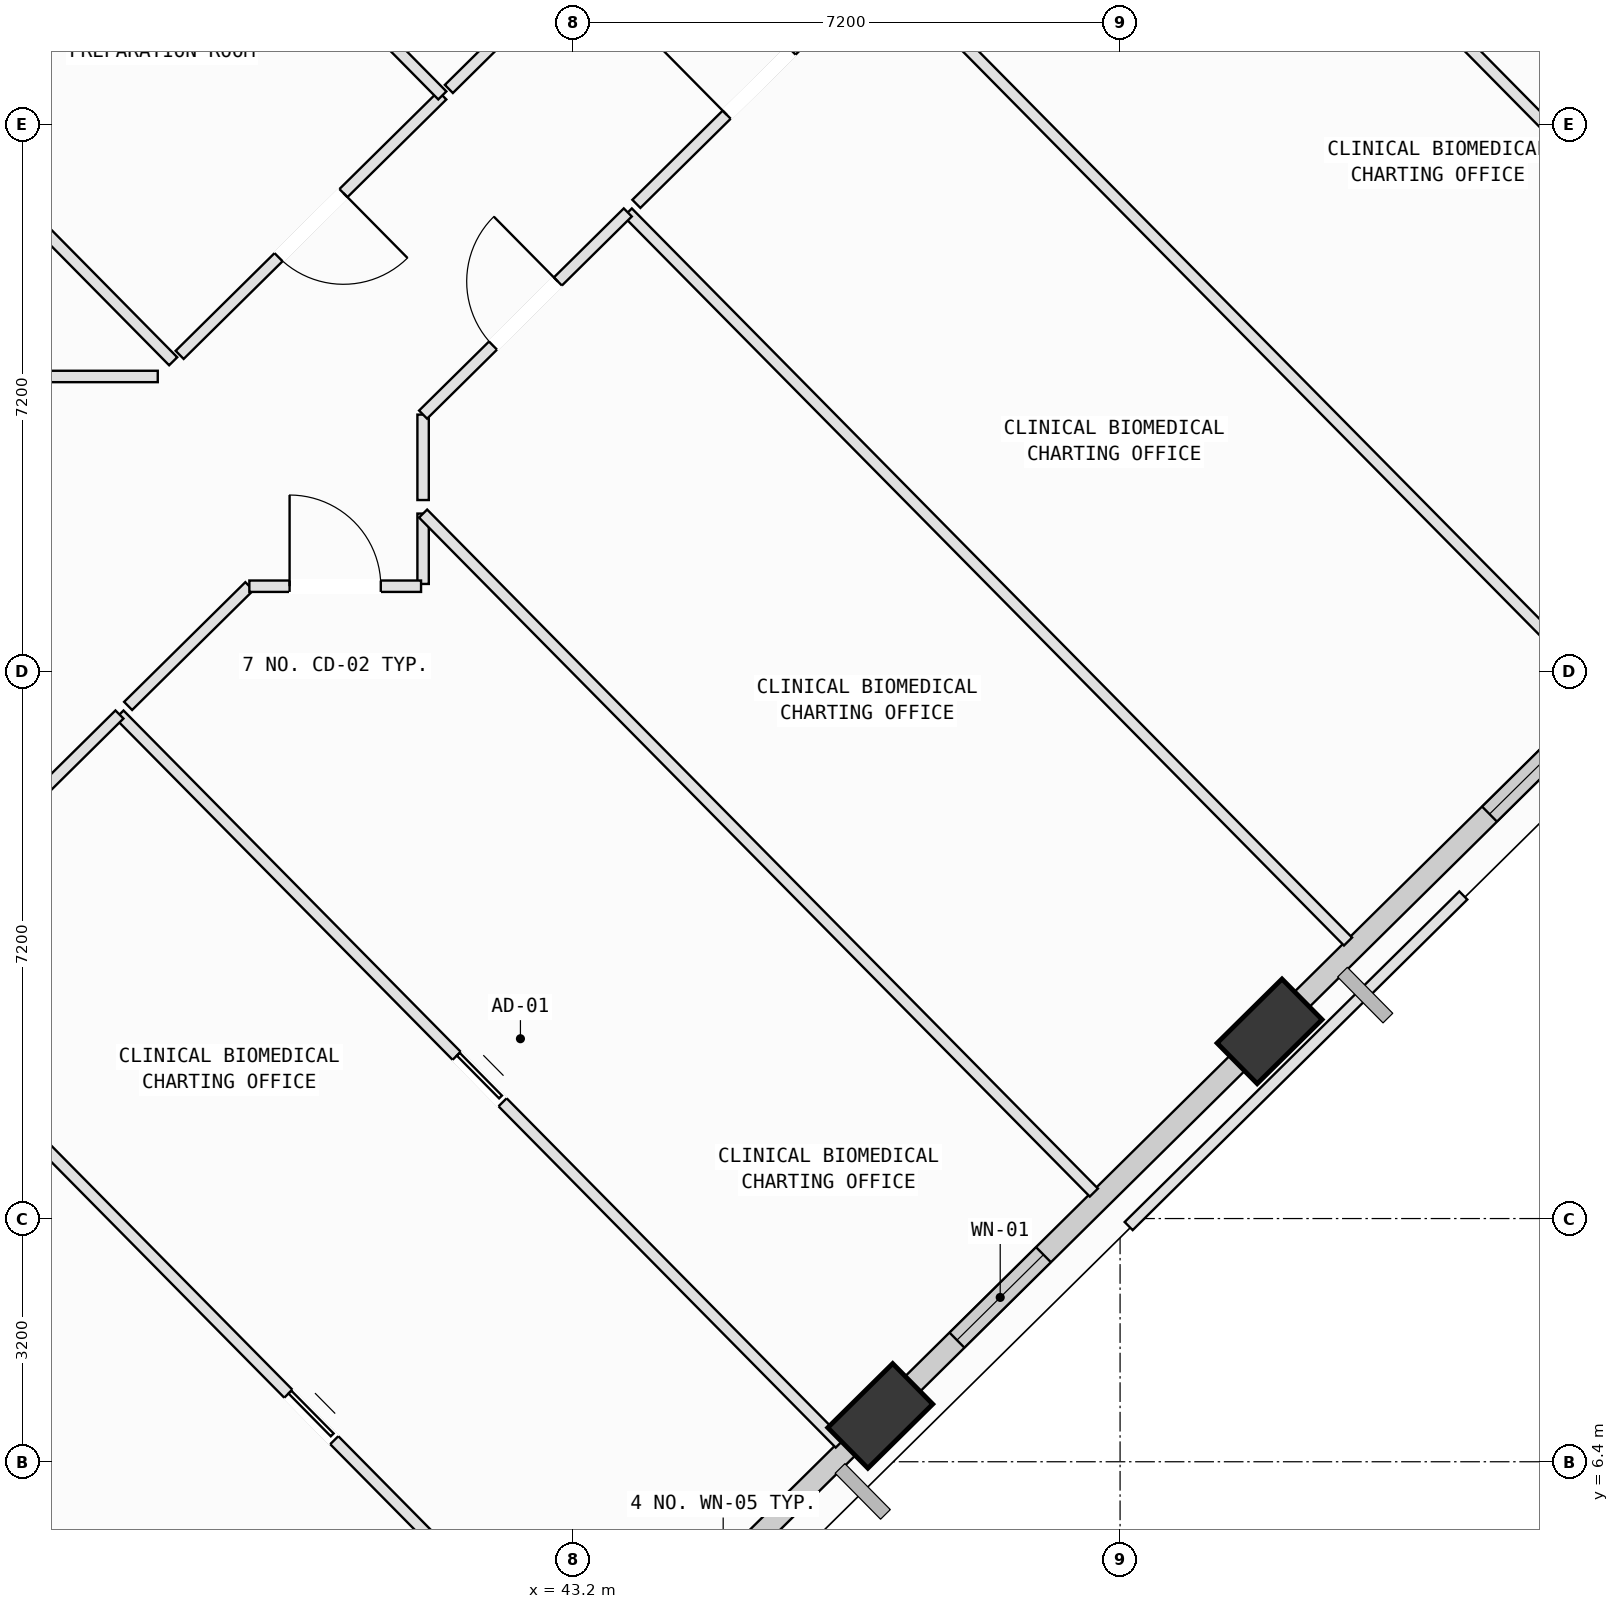
"""IFC4 building model, lengths in metres.
Left out: names, types, materials, properties, quantities, classifications, styles, units other than length and angle.
Written with IfcOpenShell. Run it as: python <this file> out.ifc"""

import sys

from ifc_helpers import new_model, si_unit, direction, frame, frame_2d, origin, origin_2d, place, context, subcontext, project, spatial, rectangle, extrude, element, fill, save


model = new_model("IFC4")
c1 = context("Model", 3, precision=1e-05, world=origin(), true_north=direction((0.0, 1.0)))
c2 = subcontext(c1, "Body", "Model", "MODEL_VIEW")
j1 = project(units=[si_unit("LENGTHUNIT", "METRE"), si_unit("PLANEANGLEUNIT", "RADIAN")], contexts=[c1])
p1 = place(None, origin())
s1 = spatial("IfcSite", under=j1, at=p1, CompositionType="ELEMENT")
p2 = place(p1, origin())
s2 = spatial("IfcBuilding", under=s1, at=p2, CompositionType="ELEMENT")
p3 = place(p2, frame((0.0, 0.0, 215.2)))
s3 = spatial("IfcBuildingStorey", under=s2, at=p3, CompositionType="ELEMENT", Elevation=215.2)
p4 = place(p3, frame((47.245, 7.003, 0.002), z_axis=(0.072994502566, 0.056935712002, 0.995705843758), x_axis=(-0.989301110701, 0.130578425032, 0.065058337529)))
e1 = element("IfcColumn", 1, at=p4, inside=s3, PredefinedType="COLUMN", context=c2, shape_type="SweptSolid", body=[
    extrude(rectangle(XDim=1.2, YDim=0.75, at=origin_2d()), origin(), (0.0, 0.0, 1.0), 4.014),
])
p5 = place(p3, frame((52.367, 12.063, 0.002), z_axis=(0.051942793998, 0.077853368054, 0.995610766934), x_axis=(-0.980116876349, -0.187202601198, 0.065773055283)))
e2 = element("IfcColumn", 2, at=p5, inside=s3, PredefinedType="COLUMN", context=c2, shape_type="SweptSolid", body=[
    extrude(rectangle(XDim=1.2, YDim=0.75, at=origin_2d()), origin(), (0.0, 0.0, 1.0), 4.014),
])
p6 = place(p3, frame((47.094, 6.854, 0.0), z_axis=(0.0, 0.0, 1.0), x_axis=(-0.711433096034, -0.702753833051, 0.0)))
e3 = element("IfcWall", 3, at=p6, inside=s3, PredefinedType="SOLIDWALL", context=c2, shape_type="SweptSolid", body=[
    extrude(rectangle(XDim=6.414, YDim=0.28, at=frame_2d((3.207, 0.0))), origin(), (0.0, 0.0, 1.0), 3.265),
])
p7 = place(p6, frame((2.093, 0.0, 0.75)))
e4 = element("IfcOpeningElement", 4, at=p7, cuts=e3, PredefinedType="OPENING", context=c2, shape_type="SweptSolid", body=[
    extrude(rectangle(XDim=1.2, YDim=1.75, at=frame_2d((0.6, 0.875))), frame((0.0, 0.15, 0.0), z_axis=(0.0, -1.0, 0.0), x_axis=(1.0, 0.0, 0.0)), (0.0, 0.0, 1.0), 0.3),
])
p8 = place(p3, frame((52.216, 11.915, 0.0), z_axis=(0.0, 0.0, 1.0), x_axis=(-0.711418692423, -0.702768414252, 0.0)))
e5 = element("IfcWall", 5, at=p8, inside=s3, PredefinedType="SOLIDWALL", context=c2, shape_type="SweptSolid", body=[
    extrude(rectangle(XDim=6.407, YDim=0.28, at=frame_2d((3.203, 0.0))), origin(), (0.0, 0.0, 1.0), 3.265),
])
p9 = place(p8, frame((3.97, 0.0, 0.75)))
e6 = element("IfcOpeningElement", 6, at=p9, cuts=e5, PredefinedType="OPENING", context=c2, shape_type="SweptSolid", body=[
    extrude(rectangle(XDim=1.6, YDim=1.95, at=frame_2d((0.8, 0.975))), frame((0.0, 0.15, 0.0), z_axis=(0.0, -1.0, 0.0), x_axis=(1.0, 0.0, 0.0)), (0.0, 0.0, 1.0), 0.3),
])
p10 = place(p3, frame((57.346, 16.981, 0.0), z_axis=(0.0, 0.0, 1.0), x_axis=(-0.711410830426, -0.702776372932, 0.0)))
e7 = element("IfcWall", 7, at=p10, inside=s3, PredefinedType="SOLIDWALL", context=c2, shape_type="SweptSolid", body=[
    extrude(rectangle(XDim=6.418, YDim=0.28, at=frame_2d((3.209, 0.0))), origin(), (0.0, 0.0, 1.0), 3.265),
])
p11 = place(p10, frame((1.731, 0.0, 0.75)))
e8 = element("IfcOpeningElement", 8, at=p11, cuts=e7, PredefinedType="OPENING", context=c2, shape_type="SweptSolid", body=[
    extrude(rectangle(XDim=1.2, YDim=1.75, at=frame_2d((0.6, 0.875))), frame((0.0, 0.15, 0.0), z_axis=(0.0, -1.0, 0.0), x_axis=(1.0, 0.0, 0.0)), (0.0, 0.0, 1.0), 0.3),
])
p12 = place(p3, frame((53.385, 28.463, 0.0), z_axis=(0.0, 0.0, 1.0), x_axis=(0.702779857977, -0.711407387663, 0.0)))
e9 = element("IfcWall", 9, at=p12, inside=s3, PredefinedType="SOLIDWALL", context=c2, shape_type="SweptSolid", body=[
    extrude(rectangle(XDim=7.046, YDim=0.28, at=frame_2d((3.523, 0.0))), origin(), (0.0, 0.0, 1.0), 3.265),
])
p13 = place(p3, frame((35.124, 24.408, 0.0), z_axis=(0.0, 0.0, 1.0), x_axis=(0.711416839959, 0.702770289513, 0.0)))
e10 = element("IfcWall", 10, at=p13, inside=s3, PredefinedType="SOLIDWALL", context=c2, shape_type="SweptSolid", body=[
    extrude(rectangle(XDim=6.409, YDim=0.28, at=frame_2d((3.205, 0.0))), origin(), (0.0, 0.0, 1.0), 3.265),
])
p14 = place(p13, frame((1.146, 0.0, 0.75)))
e11 = element("IfcOpeningElement", 11, at=p14, cuts=e10, PredefinedType="OPENING", context=c2, shape_type="SweptSolid", body=[
    extrude(rectangle(XDim=2.0, YDim=1.95, at=frame_2d((1.0, 0.975))), frame((0.0, 0.15, 0.0), z_axis=(0.0, -1.0, 0.0), x_axis=(1.0, 0.0, 0.0)), (0.0, 0.0, 1.0), 0.3),
])
p15 = place(p3, frame((32.475, 7.675, 0.0), z_axis=(0.0, 0.0, 1.0), x_axis=(0.702752952964, -0.711433965383, 0.0)))
e12 = element("IfcWall", 12, at=p15, inside=s3, PredefinedType="PARTITIONING", context=c2, shape_type="SweptSolid", body=[
    extrude(rectangle(XDim=10.743, YDim=0.15, at=frame_2d((5.372, 0.0))), origin(), (0.0, 0.0, 1.0), 3.78),
])
p16 = place(p15, frame((5.16, 0.0, 0.0)))
e13 = element("IfcOpeningElement", 13, at=p16, cuts=e12, PredefinedType="OPENING", context=c2, shape_type="SweptSolid", body=[
    extrude(rectangle(XDim=0.86, YDim=2.06, at=frame_2d((0.43, 1.03))), frame((0.0, 0.085, 0.0), z_axis=(0.0, -1.0, 0.0), x_axis=(1.0, 0.0, 0.0)), (0.0, 0.0, 1.0), 0.17),
])
p17 = place(p3, frame((36.15, 10.643, 0.0), z_axis=(0.0, 0.0, 1.0), x_axis=(0.702755477797, -0.71143147135, 0.0)))
e14 = element("IfcWall", 14, at=p17, inside=s3, PredefinedType="PARTITIONING", context=c2, shape_type="SweptSolid", body=[
    extrude(rectangle(XDim=10.271, YDim=0.15, at=frame_2d((5.135, 0.0))), origin(), (0.0, 0.0, 1.0), 3.78),
])
p18 = place(p17, frame((4.706, 0.0, 0.0)))
e15 = element("IfcOpeningElement", 15, at=p18, cuts=e14, PredefinedType="OPENING", context=c2, shape_type="SweptSolid", body=[
    extrude(rectangle(XDim=0.86, YDim=2.06, at=frame_2d((0.43, 1.03))), frame((0.0, 0.085, 0.0), z_axis=(0.0, -1.0, 0.0), x_axis=(1.0, 0.0, 0.0)), (0.0, 0.0, 1.0), 0.17),
])
p19 = place(p3, frame((37.235, 16.232, 0.0), z_axis=(0.0, 0.0, 1.0), x_axis=(0.702784644296, -0.711402659358, 0.0)))
e16 = element("IfcWall", 16, at=p19, inside=s3, PredefinedType="PARTITIONING", context=c2, shape_type="SweptSolid", body=[
    extrude(rectangle(XDim=13.485, YDim=0.15, at=frame_2d((6.742, 0.0))), origin(), (0.0, 0.0, 1.0), 3.78),
])
p20 = place(p19, frame((6.312, 0.0, 0.0)))
e17 = element("IfcOpeningElement", 17, at=p20, cuts=e16, PredefinedType="OPENING", context=c2, shape_type="SweptSolid", body=[
    extrude(rectangle(XDim=0.86, YDim=2.06, at=frame_2d((0.43, 1.03))), frame((0.0, 0.085, 0.0), z_axis=(0.0, -1.0, 0.0), x_axis=(1.0, 0.0, 0.0)), (0.0, 0.0, 1.0), 0.17),
])
p21 = place(p3, frame((36.15, 15.16, 0.0), z_axis=(0.0, 0.0, 1.0), x_axis=(0.711414882023, 0.702772271533, 0.0)))
e18 = element("IfcWall", 18, at=p21, inside=s3, PredefinedType="PARTITIONING", context=c2, shape_type="SweptSolid", body=[
    extrude(rectangle(XDim=1.525, YDim=0.15, at=frame_2d((0.763, 0.0))), origin(), (0.0, 0.0, 1.0), 3.78),
])
p22 = place(p3, frame((41.23, 17.95, 0.0), z_axis=(0.0, 0.0, 1.0), x_axis=(0.0, 1.0, 0.0)))
e19 = element("IfcWall", 19, at=p22, inside=s3, PredefinedType="PARTITIONING", context=c2, shape_type="SweptSolid", body=[
    extrude(rectangle(XDim=0.926, YDim=0.15, at=frame_2d((0.463, 0.0))), origin(), (0.0, 0.0, 1.0), 3.78),
])
p23 = place(p3, frame((41.23, 18.876, 0.0), z_axis=(0.0, 0.0, 1.0), x_axis=(0.702748277784, -0.711438583485, 0.0)))
e20 = element("IfcWall", 20, at=p23, inside=s3, PredefinedType="PARTITIONING", context=c2, shape_type="SweptSolid", body=[
    extrude(rectangle(XDim=12.558, YDim=0.15, at=frame_2d((6.279, 0.0))), origin(), (0.0, 0.0, 1.0), 3.78),
])
p24 = place(p3, frame((47.82, 7.249, 0.0), z_axis=(0.0, 0.0, 1.0), x_axis=(-0.711549525488, -0.702635946119, 0.0)))
e21 = element("IfcWall", 21, at=p24, inside=s3, PredefinedType="PARTITIONING", context=c2, shape_type="SweptSolid", body=[
    extrude(rectangle(XDim=0.794, YDim=0.15, at=frame_2d((0.397, 0.0))), origin(), (0.0, 0.0, 1.0), 3.265),
])
p25 = place(p3, frame((37.349, 16.345, 0.0), z_axis=(0.0, 0.0, 1.0), x_axis=(0.711558299302, 0.70262706089, 0.0)))
e22 = element("IfcWall", 22, at=p25, inside=s3, PredefinedType="PARTITIONING", context=c2, shape_type="SweptSolid", body=[
    extrude(rectangle(XDim=2.241, YDim=0.15, at=frame_2d((1.121, 0.0))), origin(), (0.0, 0.0, 1.0), 3.78),
])
p26 = place(p3, frame((38.944, 17.92, 0.0), z_axis=(0.0, 0.0, 1.0), x_axis=(1.0, 0.0, 0.0)))
e23 = element("IfcWall", 23, at=p26, inside=s3, PredefinedType="PARTITIONING", context=c2, shape_type="SweptSolid", body=[
    extrude(rectangle(XDim=2.259, YDim=0.15, at=frame_2d((1.129, 0.0))), origin(), (0.0, 0.0, 1.0), 3.165),
])
p27 = place(p26, frame((0.53, 0.0, 0.0)))
e24 = element("IfcOpeningElement", 24, at=p27, cuts=e23, PredefinedType="OPENING", context=c2, shape_type="SweptSolid", body=[
    extrude(rectangle(XDim=1.2, YDim=2.15, at=frame_2d((0.6, 1.075))), frame((0.0, 0.085, 0.0), z_axis=(0.0, -1.0, 0.0), x_axis=(1.0, 0.0, 0.0)), (0.0, 0.0, 1.0), 0.17),
])
p28 = place(p3, frame((43.923, 22.838, 0.0), z_axis=(0.0, 0.0, 1.0), x_axis=(0.702757042413, -0.711429925811, 0.0)))
e25 = element("IfcWall", 25, at=p28, inside=s3, PredefinedType="PARTITIONING", context=c2, shape_type="SweptSolid", body=[
    extrude(rectangle(XDim=13.484, YDim=0.15, at=frame_2d((6.742, 0.0))), origin(), (0.0, 0.0, 1.0), 3.415),
])
p29 = place(p3, frame((41.23, 19.054, 0.0), z_axis=(0.0, 0.0, 1.0), x_axis=(0.0, 1.0, 0.0)))
e26 = element("IfcWall", 26, at=p29, inside=s3, PredefinedType="PARTITIONING", context=c2, shape_type="SweptSolid", body=[
    extrude(rectangle(XDim=1.124, YDim=0.15, at=frame_2d((0.562, 0.0))), origin(), (0.0, 0.0, 1.0), 3.78),
])
p30 = place(p3, frame((41.23, 20.178, 0.0), z_axis=(0.0, 0.0, 1.0), x_axis=(0.711479053184, 0.70270730527, 0.0)))
e27 = element("IfcWall", 27, at=p30, inside=s3, PredefinedType="PARTITIONING", context=c2, shape_type="SweptSolid", body=[
    extrude(rectangle(XDim=3.785, YDim=0.15, at=frame_2d((1.893, 0.0))), origin(), (0.0, 0.0, 1.0), 3.78),
])
p31 = place(p30, frame((1.292, 0.0, 0.0)))
e28 = element("IfcOpeningElement", 28, at=p31, cuts=e27, PredefinedType="OPENING", context=c2, shape_type="SweptSolid", body=[
    extrude(rectangle(XDim=1.2, YDim=2.15, at=frame_2d((0.6, 1.075))), frame((0.0, 0.085, 0.0), z_axis=(0.0, -1.0, 0.0), x_axis=(1.0, 0.0, 0.0)), (0.0, 0.0, 1.0), 0.17),
])
p32 = place(p3, frame((44.036, 22.951, 0.0), z_axis=(0.0, 0.0, 1.0), x_axis=(0.711502616413, 0.702683447107, 0.0)))
e29 = element("IfcWall", 29, at=p32, inside=s3, PredefinedType="PARTITIONING", context=c2, shape_type="SweptSolid", body=[
    extrude(rectangle(XDim=4.54, YDim=0.15, at=frame_2d((2.27, 0.0))), origin(), (0.0, 0.0, 1.0), 3.78),
])
p33 = place(p32, frame((1.67, 0.0, 0.0)))
e30 = element("IfcOpeningElement", 30, at=p33, cuts=e29, PredefinedType="OPENING", context=c2, shape_type="SweptSolid", body=[
    extrude(rectangle(XDim=1.2, YDim=2.15, at=frame_2d((0.6, 1.075))), frame((0.0, 0.085, 0.0), z_axis=(0.0, -1.0, 0.0), x_axis=(1.0, 0.0, 0.0)), (0.0, 0.0, 1.0), 0.17),
])
p34 = place(p3, frame((47.266, 26.141, 0.0), z_axis=(0.0, 0.0, 1.0), x_axis=(0.702821292956, -0.711366452799, 0.0)))
e31 = element("IfcWall", 31, at=p34, inside=s3, PredefinedType="PARTITIONING", context=c2, shape_type="SweptSolid", body=[
    extrude(rectangle(XDim=13.485, YDim=0.15, at=frame_2d((6.743, 0.0))), origin(), (0.0, 0.0, 1.0), 3.78),
])
p35 = place(p3, frame((50.61, 29.444, 0.0), z_axis=(0.0, 0.0, 1.0), x_axis=(0.702781267374, -0.711405995356, 0.0)))
e32 = element("IfcWall", 32, at=p35, inside=s3, PredefinedType="PARTITIONING", context=c2, shape_type="SweptSolid", body=[
    extrude(rectangle(XDim=10.927, YDim=0.15, at=frame_2d((5.463, 0.0))), origin(), (0.0, 0.0, 1.0), 3.78),
])
p36 = place(p3, frame((34.4, 24.466, 0.0), z_axis=(0.0, 0.0, 1.0), x_axis=(0.70270973466, -0.711476653738, 0.0)))
e33 = element("IfcWall", 33, at=p36, inside=s3, PredefinedType="PARTITIONING", context=c2, shape_type="SweptSolid", body=[
    extrude(rectangle(XDim=5.041, YDim=0.15, at=frame_2d((2.52, 0.0))), origin(), (0.0, 0.0, 1.0), 3.78),
])
p37 = place(p3, frame((37.739, 20.68, 0.0), z_axis=(0.0, 0.0, 1.0), x_axis=(-1.0, 0.0, 0.0)))
e34 = element("IfcWall", 34, at=p37, inside=s3, PredefinedType="PARTITIONING", context=c2, shape_type="SweptSolid", body=[
    extrude(rectangle(XDim=6.225, YDim=0.15, at=frame_2d((3.113, 0.0))), origin(), (0.0, 0.0, 1.0), 3.78),
])
p38 = place(p37, frame((2.613, 0.0, 0.0)))
e35 = element("IfcOpeningElement", 35, at=p38, cuts=e34, PredefinedType="OPENING", context=c2, shape_type="SweptSolid", body=[
    extrude(rectangle(XDim=1.0, YDim=2.12, at=frame_2d((0.5, 1.06))), frame((0.0, 0.085, 0.0), z_axis=(0.0, -1.0, 0.0), x_axis=(1.0, 0.0, 0.0)), (0.0, 0.0, 1.0), 0.17),
])
p39 = place(p3, frame((41.483, 24.378, 0.0), z_axis=(0.0, 0.0, 1.0), x_axis=(-0.711415843034, -0.702771298703, 0.0)))
e36 = element("IfcWall", 36, at=p39, inside=s3, PredefinedType="PARTITIONING", context=c2, shape_type="SweptSolid", body=[
    extrude(rectangle(XDim=4.858, YDim=0.15, at=frame_2d((2.429, 0.0))), origin(), (0.0, 0.0, 1.0), 3.165),
])
p40 = place(p39, frame((1.829, 0.0, 0.0)))
e37 = element("IfcOpeningElement", 37, at=p40, cuts=e36, PredefinedType="OPENING", context=c2, shape_type="SweptSolid", body=[
    extrude(rectangle(XDim=1.2, YDim=2.15, at=frame_2d((0.6, 1.075))), frame((0.0, 0.085, 0.0), z_axis=(0.0, -1.0, 0.0), x_axis=(1.0, 0.0, 0.0)), (0.0, 0.0, 1.0), 0.17),
])
p41 = place(p3, frame((34.485, 24.55, 0.0), z_axis=(0.0, 0.0, 1.0), x_axis=(0.711390715855, 0.702796734053, 0.0)))
e38 = element("IfcWall", 38, at=p41, inside=s3, PredefinedType="PARTITIONING", context=c2, shape_type="SweptSolid", body=[
    extrude(rectangle(XDim=4.858, YDim=0.15, at=frame_2d((2.429, 0.0))), origin(), (0.0, 0.0, 1.0), 3.78),
])
p42 = place(p3, frame((38.408, 27.491, 0.0), z_axis=(0.0, 0.0, 1.0), x_axis=(0.702741357697, -0.711445418976, 0.0)))
e39 = element("IfcWall", 39, at=p42, inside=s3, PredefinedType="PARTITIONING", context=c2, shape_type="SweptSolid", body=[
    extrude(rectangle(XDim=4.376, YDim=0.15, at=frame_2d((2.188, 0.0))), origin(), (0.0, 0.0, 1.0), 3.415),
])
p43 = place(p3, frame((45.211, 28.061, 0.0), z_axis=(0.0, 0.0, 1.0), x_axis=(-0.711361976558, -0.702825823592, 0.0)))
e40 = element("IfcWall", 40, at=p43, inside=s3, PredefinedType="PARTITIONING", context=c2, shape_type="SweptSolid", body=[
    extrude(rectangle(XDim=5.12, YDim=0.15, at=frame_2d((2.56, 0.0))), origin(), (0.0, 0.0, 1.0), 3.78),
])
p44 = place(p43, frame((2.1, 0.0, 0.0)))
e41 = element("IfcOpeningElement", 41, at=p44, cuts=e40, PredefinedType="OPENING", context=c2, shape_type="SweptSolid", body=[
    extrude(rectangle(XDim=0.92, YDim=2.1, at=frame_2d((0.46, 1.05))), frame((0.0, 0.085, 0.0), z_axis=(0.0, -1.0, 0.0), x_axis=(1.0, 0.0, 0.0)), (0.0, 0.0, 1.0), 0.17),
])
p45 = place(p3, frame((54.916, 13.851, 0.0), z_axis=(0.0, 0.0, 1.0), x_axis=(-0.711373509775, -0.702814150107, 0.0)))
e42 = element("IfcWall", 42, at=p45, inside=s3, PredefinedType="PARTITIONING", context=c2, shape_type="SweptSolid", body=[
    extrude(rectangle(XDim=6.189, YDim=0.15, at=frame_2d((3.095, 0.0))), origin(), (0.0, 0.0, 1.0), 3.78),
])
p46 = place(p3, frame((51.866, 30.784, 0.0), z_axis=(0.0, 0.0, 1.0), x_axis=(0.702774280848, -0.711412897113, 0.0)))
e43 = element("IfcWall", 43, at=p46, inside=s3, PredefinedType="PARTITIONING", context=c2, shape_type="SweptSolid", body=[
    extrude(rectangle(XDim=11.22, YDim=0.15, at=frame_2d((5.61, 0.0))), origin(), (0.0, 0.0, 1.0), 3.265),
])
p47 = place(p9, origin())
e44 = element("IfcWindow", 44, at=p47, inside=s3, PartitioningType="SINGLE_PANEL", PredefinedType="WINDOW", context=c2, shape_type="SweptSolid", body=[
    extrude(rectangle(XDim=1.6, YDim=1.95, at=frame_2d((0.8, 0.975))), frame((0.0, 0.03, 0.0), z_axis=(0.0, -1.0, 0.0), x_axis=(1.0, 0.0, 0.0)), (0.0, 0.0, 1.0), 0.06),
])
fill(e6, e44)
p48 = place(p11, origin())
e45 = element("IfcWindow", 45, at=p48, inside=s3, PartitioningType="SINGLE_PANEL", PredefinedType="WINDOW", context=c2, shape_type="SweptSolid", body=[
    extrude(rectangle(XDim=1.2, YDim=1.75, at=frame_2d((0.6, 0.875))), frame((0.0, 0.03, 0.0), z_axis=(0.0, -1.0, 0.0), x_axis=(1.0, 0.0, 0.0)), (0.0, 0.0, 1.0), 0.06),
])
fill(e8, e45)
p49 = place(p27, origin())
e46 = element("IfcDoor", 46, at=p49, inside=s3, OperationType="SINGLE_SWING_LEFT", PredefinedType="DOOR", context=c2, shape_type="SweptSolid", body=[
    extrude(rectangle(XDim=1.2, YDim=2.15, at=frame_2d((0.6, 1.075))), frame((0.0, 0.025, 0.0), z_axis=(0.0, -1.0, 0.0), x_axis=(1.0, 0.0, 0.0)), (0.0, 0.0, 1.0), 0.05),
])
fill(e24, e46)
p50 = place(p31, origin())
e47 = element("IfcDoor", 47, at=p50, inside=s3, OperationType="SINGLE_SWING_RIGHT", PredefinedType="DOOR", context=c2, shape_type="SweptSolid", body=[
    extrude(rectangle(XDim=1.2, YDim=2.15, at=frame_2d((0.6, 1.075))), frame((0.0, 0.025, 0.0), z_axis=(0.0, -1.0, 0.0), x_axis=(1.0, 0.0, 0.0)), (0.0, 0.0, 1.0), 0.05),
])
fill(e28, e47)
p51 = place(p33, origin())
e48 = element("IfcDoor", 48, at=p51, inside=s3, OperationType="SINGLE_SWING_LEFT", PredefinedType="DOOR", context=c2, shape_type="SweptSolid", body=[
    extrude(rectangle(XDim=1.2, YDim=2.15, at=frame_2d((0.6, 1.075))), frame((0.0, 0.025, 0.0), z_axis=(0.0, -1.0, 0.0), x_axis=(1.0, 0.0, 0.0)), (0.0, 0.0, 1.0), 0.05),
])
fill(e30, e48)
p52 = place(p40, origin())
e49 = element("IfcDoor", 49, at=p52, inside=s3, OperationType="SINGLE_SWING_LEFT", PredefinedType="DOOR", context=c2, shape_type="SweptSolid", body=[
    extrude(rectangle(XDim=1.2, YDim=2.15, at=frame_2d((0.6, 1.075))), frame((0.0, 0.025, 0.0), z_axis=(0.0, -1.0, 0.0), x_axis=(1.0, 0.0, 0.0)), (0.0, 0.0, 1.0), 0.05),
])
fill(e37, e49)
p53 = place(p20, origin())
e50 = element("IfcDoor", 50, at=p53, inside=s3, OperationType="SLIDING_TO_LEFT", PredefinedType="DOOR", context=c2, shape_type="SweptSolid", body=[
    extrude(rectangle(XDim=0.86, YDim=2.06, at=frame_2d((0.43, 1.03))), frame((0.0, 0.025, 0.0), z_axis=(0.0, -1.0, 0.0), x_axis=(1.0, 0.0, 0.0)), (0.0, 0.0, 1.0), 0.05),
])
fill(e17, e50)
p54 = place(p18, origin())
e51 = element("IfcDoor", 51, at=p54, inside=s3, OperationType="SLIDING_TO_LEFT", PredefinedType="DOOR", context=c2, shape_type="SweptSolid", body=[
    extrude(rectangle(XDim=0.86, YDim=2.06, at=frame_2d((0.43, 1.03))), frame((0.0, 0.025, 0.0), z_axis=(0.0, -1.0, 0.0), x_axis=(1.0, 0.0, 0.0)), (0.0, 0.0, 1.0), 0.05),
])
fill(e15, e51)
save(model, sys.argv[1])
